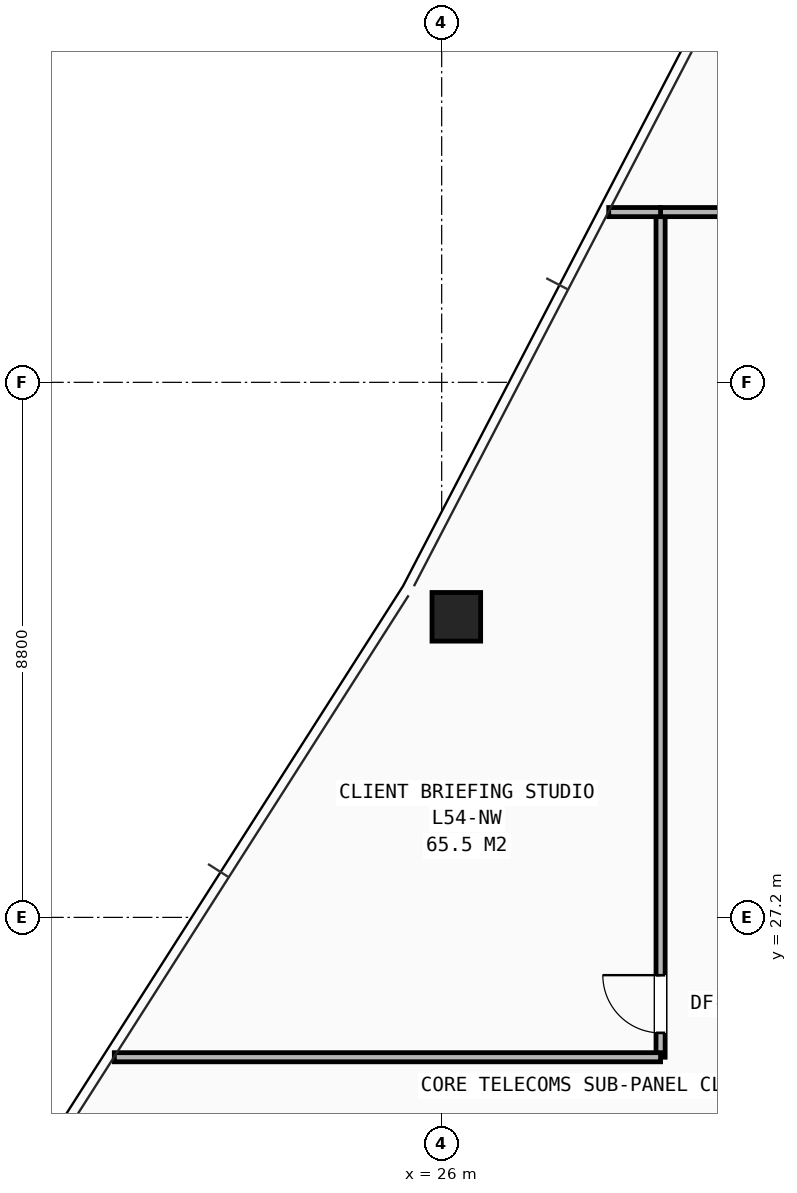
"""IFC4 building model, lengths in metres.
Left out: names, types, materials, properties, quantities, classifications, styles, units other than length and angle.
Written with IfcOpenShell. Run it as: python <this file> out.ifc"""

import sys

from ifc_helpers import new_model, si_unit, direction, frame, frame_2d, origin, origin_2d, place, context, subcontext, project, spatial, rectangle, hollow_rectangle, extrude, element, fill, save


model = new_model("IFC4")
c1 = context("Model", 3, precision=1e-05, world=origin(), true_north=direction((0.0, 1.0)))
c2 = subcontext(c1, "Body", "Model", "MODEL_VIEW")
j1 = project(units=[si_unit("LENGTHUNIT", "METRE"), si_unit("PLANEANGLEUNIT", "RADIAN")], contexts=[c1])
p1 = place(None, origin())
s1 = spatial("IfcSite", under=j1, at=p1, CompositionType="ELEMENT")
p2 = place(p1, origin())
s2 = spatial("IfcBuilding", under=s1, at=p2, CompositionType="ELEMENT")
p3 = place(p2, frame((0.0, 0.0, 189.6)))
s3 = spatial("IfcBuildingStorey", under=s2, at=p3, CompositionType="ELEMENT", Elevation=189.6)
p4 = place(p3, frame((26.241, 32.144, 0.0), z_axis=(0.0, 0.0, 1.0), x_axis=(1.0, 0.0, 0.0)))
e1 = element("IfcColumn", 1, at=p4, inside=s3, PredefinedType="COLUMN", context=c2, shape_type="SweptSolid", body=[
    extrude(hollow_rectangle(XDim=0.8, YDim=0.8, WallThickness=0.055, at=origin_2d()), origin(), (0.0, 0.0, 1.0), 3.45),
])
p5 = place(p3, frame((29.6, 24.9, 0.0), z_axis=(0.0, 0.0, 1.0), x_axis=(0.0, 1.0, 0.0)))
e2 = element("IfcWall", 2, at=p5, inside=s3, PredefinedType="PARTITIONING", context=c2, shape_type="SweptSolid", body=[
    extrude(rectangle(XDim=13.9, YDim=0.15, at=frame_2d((6.95, 0.0))), origin(), (0.0, 0.0, 1.0), 2.225),
])
p6 = place(p5, frame((0.4, 0.0, 0.0)))
e3 = element("IfcOpeningElement", 3, at=p6, cuts=e2, PredefinedType="OPENING", context=c2, shape_type="SweptSolid", body=[
    extrude(rectangle(XDim=0.95, YDim=2.1, at=frame_2d((0.475, 1.05))), frame((0.0, 0.085, 0.0), z_axis=(0.0, -1.0, 0.0), x_axis=(1.0, 0.0, 0.0)), (0.0, 0.0, 1.0), 0.17),
])
p7 = place(p3, frame((29.6, 38.8, 0.0), z_axis=(0.0, 0.0, 1.0), x_axis=(1.0, 0.0, 0.0)))
e4 = element("IfcWall", 4, at=p7, inside=s3, PredefinedType="PARTITIONING", context=c2, shape_type="SweptSolid", body=[
    extrude(rectangle(XDim=2.2, YDim=0.15, at=frame_2d((1.1, 0.0))), origin(), (0.0, 0.0, 1.0), 2.589),
])
p8 = place(p3, frame((20.616, 24.9, 0.0), z_axis=(0.0, 0.0, 1.0), x_axis=(1.0, 0.0, 0.0)))
e5 = element("IfcWall", 5, at=p8, inside=s3, PredefinedType="PARTITIONING", context=c2, shape_type="SweptSolid", body=[
    extrude(rectangle(XDim=8.984, YDim=0.15, at=frame_2d((4.492, 0.0))), origin(), (0.0, 0.0, 1.0), 2.589),
])
p9 = place(p3, frame((28.747, 38.8, 0.0), z_axis=(0.0, 0.0, 1.0), x_axis=(1.0, 0.0, 0.0)))
e6 = element("IfcWall", 6, at=p9, inside=s3, PredefinedType="PARTITIONING", context=c2, shape_type="SweptSolid", body=[
    extrude(rectangle(XDim=0.853, YDim=0.15, at=frame_2d((0.427, 0.0))), origin(), (0.0, 0.0, 1.0), 2.589),
])
p10 = place(p6, origin())
e7 = element("IfcDoor", 7, at=p10, inside=s3, OperationType="SINGLE_SWING_RIGHT", PredefinedType="DOOR", context=c2, shape_type="SweptSolid", body=[
    extrude(rectangle(XDim=0.95, YDim=2.1, at=frame_2d((0.475, 1.05))), frame((0.0, 0.025, 0.0), z_axis=(0.0, -1.0, 0.0), x_axis=(1.0, 0.0, 0.0)), (0.0, 0.0, 1.0), 0.05),
])
fill(e3, e7)
save(model, sys.argv[1])
